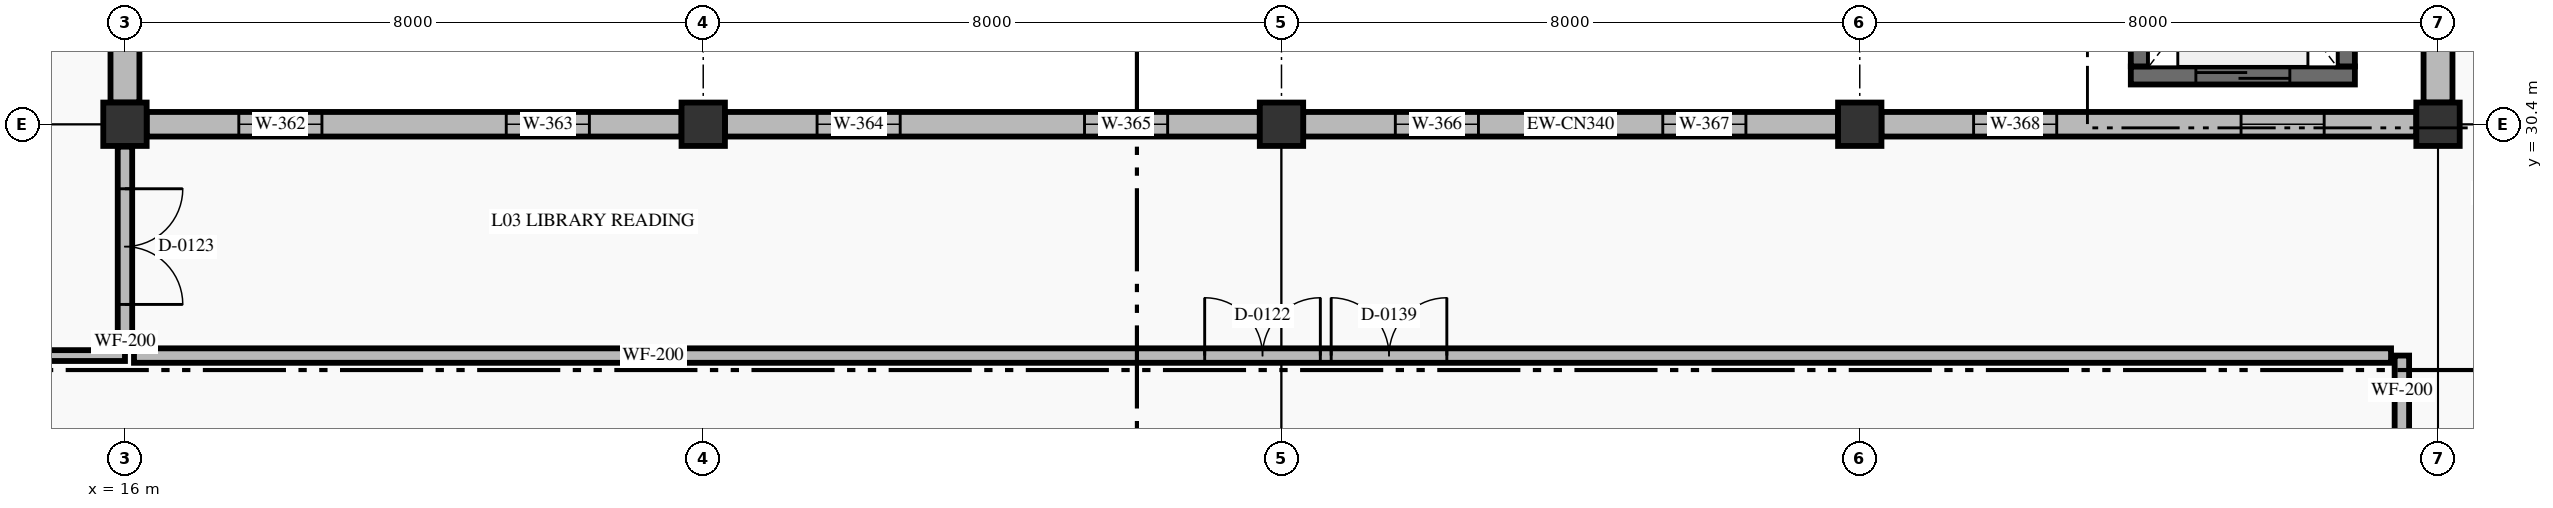
"""IFC4 building model, lengths in metres.
Left out: names, types, materials, properties, quantities, classifications, styles, units other than length and angle.
Written with IfcOpenShell. Run it as: python <this file> out.ifc"""

import sys

from ifc_helpers import new_model, si_unit, direction, frame, frame_2d, origin, origin_2d, place, context, subcontext, project, spatial, rectangle, extrude, element, fill, save


model = new_model("IFC4")
c1 = context("Model", 3, precision=1e-05, world=origin(), true_north=direction((0.0, 1.0)))
c2 = subcontext(c1, "Body", "Model", "MODEL_VIEW")
j1 = project(units=[si_unit("LENGTHUNIT", "METRE"), si_unit("PLANEANGLEUNIT", "RADIAN")], contexts=[c1])
p1 = place(None, origin())
s1 = spatial("IfcSite", under=j1, at=p1, CompositionType="ELEMENT")
p2 = place(p1, origin())
s2 = spatial("IfcBuilding", under=s1, at=p2, CompositionType="ELEMENT")
p3 = place(p2, frame((0.0, 0.0, 10.2)))
s3 = spatial("IfcBuildingStorey", under=s2, at=p3, CompositionType="ELEMENT", Elevation=10.2)
for number, where, z_axis, x_axis in (
    (1, (16.0, 30.4, 0.0), (0.0, 0.0, 1.0), (1.0, 0.0, 0.0)),
    (2, (24.0, 30.4, 0.0), (0.0, 0.0, 1.0), (1.0, 0.0, 0.0)),
    (3, (32.0, 30.4, 0.0), (0.0, 0.0, 1.0), (1.0, 0.0, 0.0)),
    (4, (40.0, 30.4, 0.0), (0.0, 0.0, 1.0), (1.0, 0.0, 0.0)),
    (5, (48.0, 30.4, 0.0), (0.0, 0.0, 1.0), (1.0, 0.0, 0.0)),
):
    element("IfcColumn", number, at=place(p3, frame(where, z_axis=z_axis, x_axis=x_axis)), inside=s3, PredefinedType="COLUMN", context=c2, shape_type="SweptSolid", body=[
        extrude(rectangle(XDim=0.6, YDim=0.6, at=origin_2d()), origin(), (0.0, 0.0, 1.0), 4.5),
    ])
p4 = place(p3, frame((16.0, 37.7, 0.0), z_axis=(0.0, 0.0, 1.0), x_axis=(0.0, -1.0, 0.0)))
e6 = element("IfcWall", 6, at=p4, inside=s3, PredefinedType="STANDARD", context=c2, shape_type="SweptSolid", body=[
    extrude(rectangle(XDim=7.0, YDim=0.4, at=frame_2d((3.5, 0.0))), origin(), (0.0, 0.0, 1.0), 3.67),
])
p5 = place(p4, frame((1.0, 0.0, 0.9)))
e7 = element("IfcOpeningElement", 7, at=p5, cuts=e6, PredefinedType="OPENING", context=c2, shape_type="SweptSolid", body=[
    extrude(rectangle(XDim=1.5, YDim=2.0, at=frame_2d((0.75, 1.0))), frame((0.0, 0.21, 0.0), z_axis=(0.0, -1.0, 0.0), x_axis=(1.0, 0.0, 0.0)), (0.0, 0.0, 1.0), 0.42),
])
p6 = place(p4, frame((4.5, 0.0, 0.9)))
e8 = element("IfcOpeningElement", 8, at=p6, cuts=e6, PredefinedType="OPENING", context=c2, shape_type="SweptSolid", body=[
    extrude(rectangle(XDim=1.5, YDim=2.0, at=frame_2d((0.75, 1.0))), frame((0.0, 0.21, 0.0), z_axis=(0.0, -1.0, 0.0), x_axis=(1.0, 0.0, 0.0)), (0.0, 0.0, 1.0), 0.42),
])
p7 = place(p3, frame((16.3, 30.4, 0.0), z_axis=(0.0, 0.0, 1.0), x_axis=(1.0, 0.0, 0.0)))
e9 = element("IfcWall", 9, at=p7, inside=s3, PredefinedType="STANDARD", context=c2, shape_type="SweptSolid", body=[
    extrude(rectangle(XDim=7.4, YDim=0.34, at=frame_2d((3.7, 0.0))), origin(), (0.0, 0.0, 1.0), 3.62),
])
p8 = place(p7, frame((1.275, 0.0, 1.05)))
e10 = element("IfcOpeningElement", 10, at=p8, cuts=e9, PredefinedType="OPENING", context=c2, shape_type="SweptSolid", body=[
    extrude(rectangle(XDim=1.15, YDim=1.5, at=frame_2d((0.575, 0.75))), frame((0.0, 0.18, 0.0), z_axis=(0.0, -1.0, 0.0), x_axis=(1.0, 0.0, 0.0)), (0.0, 0.0, 1.0), 0.36),
])
p9 = place(p7, frame((4.975, 0.0, 1.05)))
e11 = element("IfcOpeningElement", 11, at=p9, cuts=e9, PredefinedType="OPENING", context=c2, shape_type="SweptSolid", body=[
    extrude(rectangle(XDim=1.15, YDim=1.5, at=frame_2d((0.575, 0.75))), frame((0.0, 0.18, 0.0), z_axis=(0.0, -1.0, 0.0), x_axis=(1.0, 0.0, 0.0)), (0.0, 0.0, 1.0), 0.36),
])
p10 = place(p3, frame((24.3, 30.4, 0.0), z_axis=(0.0, 0.0, 1.0), x_axis=(1.0, 0.0, 0.0)))
e12 = element("IfcWall", 12, at=p10, inside=s3, PredefinedType="STANDARD", context=c2, shape_type="SweptSolid", body=[
    extrude(rectangle(XDim=7.4, YDim=0.34, at=frame_2d((3.7, 0.0))), origin(), (0.0, 0.0, 1.0), 3.62),
])
p11 = place(p10, frame((1.275, 0.0, 1.05)))
e13 = element("IfcOpeningElement", 13, at=p11, cuts=e12, PredefinedType="OPENING", context=c2, shape_type="SweptSolid", body=[
    extrude(rectangle(XDim=1.15, YDim=1.5, at=frame_2d((0.575, 0.75))), frame((0.0, 0.18, 0.0), z_axis=(0.0, -1.0, 0.0), x_axis=(1.0, 0.0, 0.0)), (0.0, 0.0, 1.0), 0.36),
])
p12 = place(p10, frame((4.975, 0.0, 1.05)))
e14 = element("IfcOpeningElement", 14, at=p12, cuts=e12, PredefinedType="OPENING", context=c2, shape_type="SweptSolid", body=[
    extrude(rectangle(XDim=1.15, YDim=1.5, at=frame_2d((0.575, 0.75))), frame((0.0, 0.18, 0.0), z_axis=(0.0, -1.0, 0.0), x_axis=(1.0, 0.0, 0.0)), (0.0, 0.0, 1.0), 0.36),
])
p13 = place(p3, frame((32.3, 30.4, 0.0), z_axis=(0.0, 0.0, 1.0), x_axis=(1.0, 0.0, 0.0)))
e15 = element("IfcWall", 15, at=p13, inside=s3, PredefinedType="STANDARD", context=c2, shape_type="SweptSolid", body=[
    extrude(rectangle(XDim=7.4, YDim=0.34, at=frame_2d((3.7, 0.0))), origin(), (0.0, 0.0, 1.0), 3.62),
])
p14 = place(p13, frame((1.275, 0.0, 1.05)))
e16 = element("IfcOpeningElement", 16, at=p14, cuts=e15, PredefinedType="OPENING", context=c2, shape_type="SweptSolid", body=[
    extrude(rectangle(XDim=1.15, YDim=1.5, at=frame_2d((0.575, 0.75))), frame((0.0, 0.18, 0.0), z_axis=(0.0, -1.0, 0.0), x_axis=(1.0, 0.0, 0.0)), (0.0, 0.0, 1.0), 0.36),
])
p15 = place(p13, frame((4.975, 0.0, 1.05)))
e17 = element("IfcOpeningElement", 17, at=p15, cuts=e15, PredefinedType="OPENING", context=c2, shape_type="SweptSolid", body=[
    extrude(rectangle(XDim=1.15, YDim=1.5, at=frame_2d((0.575, 0.75))), frame((0.0, 0.18, 0.0), z_axis=(0.0, -1.0, 0.0), x_axis=(1.0, 0.0, 0.0)), (0.0, 0.0, 1.0), 0.36),
])
p16 = place(p3, frame((40.3, 30.4, 0.0), z_axis=(0.0, 0.0, 1.0), x_axis=(1.0, 0.0, 0.0)))
e18 = element("IfcWall", 18, at=p16, inside=s3, PredefinedType="STANDARD", context=c2, shape_type="SweptSolid", body=[
    extrude(rectangle(XDim=7.4, YDim=0.34, at=frame_2d((3.7, 0.0))), origin(), (0.0, 0.0, 1.0), 3.62),
])
p17 = place(p16, frame((1.275, 0.0, 1.05)))
e19 = element("IfcOpeningElement", 19, at=p17, cuts=e18, PredefinedType="OPENING", context=c2, shape_type="SweptSolid", body=[
    extrude(rectangle(XDim=1.15, YDim=1.5, at=frame_2d((0.575, 0.75))), frame((0.0, 0.18, 0.0), z_axis=(0.0, -1.0, 0.0), x_axis=(1.0, 0.0, 0.0)), (0.0, 0.0, 1.0), 0.36),
])
p18 = place(p16, frame((4.975, 0.0, 1.05)))
e20 = element("IfcOpeningElement", 20, at=p18, cuts=e18, PredefinedType="OPENING", context=c2, shape_type="SweptSolid", body=[
    extrude(rectangle(XDim=1.15, YDim=1.5, at=frame_2d((0.575, 0.75))), frame((0.0, 0.18, 0.0), z_axis=(0.0, -1.0, 0.0), x_axis=(1.0, 0.0, 0.0)), (0.0, 0.0, 1.0), 0.36),
])
p19 = place(p3, frame((48.0, 30.7, 0.0), z_axis=(0.0, 0.0, 1.0), x_axis=(0.0, 1.0, 0.0)))
e21 = element("IfcWall", 21, at=p19, inside=s3, PredefinedType="STANDARD", context=c2, shape_type="SweptSolid", body=[
    extrude(rectangle(XDim=7.0, YDim=0.4, at=frame_2d((3.5, 0.0))), origin(), (0.0, 0.0, 1.0), 3.67),
])
p20 = place(p19, frame((0.9, 0.0, 0.9)))
e22 = element("IfcOpeningElement", 22, at=p20, cuts=e21, PredefinedType="OPENING", context=c2, shape_type="SweptSolid", body=[
    extrude(rectangle(XDim=1.7, YDim=2.35, at=frame_2d((0.85, 1.175))), frame((0.0, 0.21, 0.0), z_axis=(0.0, -1.0, 0.0), x_axis=(1.0, 0.0, 0.0)), (0.0, 0.0, 1.0), 0.42),
])
p21 = place(p19, frame((4.4, 0.0, 0.9)))
e23 = element("IfcOpeningElement", 23, at=p21, cuts=e21, PredefinedType="OPENING", context=c2, shape_type="SweptSolid", body=[
    extrude(rectangle(XDim=1.7, YDim=2.35, at=frame_2d((0.85, 1.175))), frame((0.0, 0.21, 0.0), z_axis=(0.0, -1.0, 0.0), x_axis=(1.0, 0.0, 0.0)), (0.0, 0.0, 1.0), 0.42),
])
p22 = place(p3, frame((46.85, 31.075, 0.0), z_axis=(0.0, 0.0, 1.0), x_axis=(-1.0, 0.0, 0.0)))
e24 = element("IfcWall", 24, at=p22, inside=s3, PredefinedType="SHEAR", context=c2, shape_type="SweptSolid", body=[
    extrude(rectangle(XDim=3.1, YDim=0.25, at=frame_2d((1.55, 0.0))), origin(), (0.0, 0.0, 1.0), 4.26),
])
p23 = place(p22, frame((0.9, 0.0, 0.0)))
e25 = element("IfcOpeningElement", 25, at=p23, cuts=e24, PredefinedType="OPENING", context=c2, shape_type="SweptSolid", body=[
    extrude(rectangle(XDim=1.3, YDim=2.25, at=frame_2d((0.65, 1.125))), frame((0.0, 0.135, 0.0), z_axis=(0.0, -1.0, 0.0), x_axis=(1.0, 0.0, 0.0)), (0.0, 0.0, 1.0), 0.27),
])
for number, where, z_axis, x_axis in (
    (26, (43.875, 31.2, 0.0), (0.0, 0.0, 1.0), (0.0, 1.0, 0.0)),
    (27, (46.725, 34.6, 0.0), (0.0, 0.0, 1.0), (0.0, -1.0, 0.0)),
):
    element("IfcWall", number, at=place(p3, frame(where, z_axis=z_axis, x_axis=x_axis)), inside=s3, PredefinedType="SHEAR", context=c2, shape_type="SweptSolid", body=[
        extrude(rectangle(XDim=3.4, YDim=0.25, at=frame_2d((1.7, 0.0))), origin(), (0.0, 0.0, 1.0), 4.26),
    ])
p24 = place(p3, frame((8.0, 27.2, 0.0), z_axis=(0.0, 0.0, 1.0), x_axis=(1.0, 0.0, 0.0)))
e28 = element("IfcWall", 28, at=p24, inside=s3, PredefinedType="PARTITIONING", context=c2, shape_type="SweptSolid", body=[
    extrude(rectangle(XDim=8.0, YDim=0.15, at=frame_2d((4.0, 0.0))), origin(), (0.0, 0.0, 1.0), 4.26),
])
p25 = place(p3, frame((47.5, 27.2, 0.0), z_axis=(0.0, 0.0, 1.0), x_axis=(0.0, -1.0, 0.0)))
e29 = element("IfcWall", 29, at=p25, inside=s3, PredefinedType="STANDARD", context=c2, shape_type="SweptSolid", body=[
    extrude(rectangle(XDim=4.4, YDim=0.2, at=frame_2d((2.2, 0.0))), origin(), (0.0, 0.0, 1.0), 4.26),
])
p26 = place(p25, frame((1.4, 0.0, 0.0)))
e30 = element("IfcOpeningElement", 30, at=p26, cuts=e29, PredefinedType="OPENING", context=c2, shape_type="SweptSolid", body=[
    extrude(rectangle(XDim=1.6, YDim=2.3, at=frame_2d((0.8, 1.15))), frame((0.0, 0.11, 0.0), z_axis=(0.0, -1.0, 0.0), x_axis=(1.0, 0.0, 0.0)), (0.0, 0.0, 1.0), 0.22),
])
p27 = place(p3, frame((16.125, 27.2, 0.0), z_axis=(0.0, 0.0, 1.0), x_axis=(1.0, 0.0, 0.0)))
e31 = element("IfcWall", 31, at=p27, inside=s3, PredefinedType="STANDARD", context=c2, shape_type="SweptSolid", body=[
    extrude(rectangle(XDim=31.225, YDim=0.2, at=frame_2d((15.613, 0.0))), origin(), (0.0, 0.0, 1.0), 4.26),
])
p28 = place(p27, frame((14.812, 0.0, 0.0)))
e32 = element("IfcOpeningElement", 32, at=p28, cuts=e31, PredefinedType="OPENING", context=c2, shape_type="SweptSolid", body=[
    extrude(rectangle(XDim=1.6, YDim=2.3, at=frame_2d((0.8, 1.15))), frame((0.0, 0.11, 0.0), z_axis=(0.0, -1.0, 0.0), x_axis=(1.0, 0.0, 0.0)), (0.0, 0.0, 1.0), 0.22),
])
p29 = place(p27, frame((16.562, 0.0, 0.0)))
e33 = element("IfcOpeningElement", 33, at=p29, cuts=e31, PredefinedType="OPENING", context=c2, shape_type="SweptSolid", body=[
    extrude(rectangle(XDim=1.6, YDim=2.3, at=frame_2d((0.8, 1.15))), frame((0.0, 0.11, 0.0), z_axis=(0.0, -1.0, 0.0), x_axis=(1.0, 0.0, 0.0)), (0.0, 0.0, 1.0), 0.22),
])
p30 = place(p3, frame((16.0, 30.09, 0.0), z_axis=(0.0, 0.0, 1.0), x_axis=(0.0, -1.0, 0.0)))
e34 = element("IfcWall", 34, at=p30, inside=s3, PredefinedType="STANDARD", context=c2, shape_type="SweptSolid", body=[
    extrude(rectangle(XDim=2.765, YDim=0.2, at=frame_2d((1.383, 0.0))), origin(), (0.0, 0.0, 1.0), 3.67),
])
p31 = place(p30, frame((0.583, 0.0, 0.0)))
e35 = element("IfcOpeningElement", 35, at=p31, cuts=e34, PredefinedType="OPENING", context=c2, shape_type="SweptSolid", body=[
    extrude(rectangle(XDim=1.6, YDim=2.3, at=frame_2d((0.8, 1.15))), frame((0.0, 0.11, 0.0), z_axis=(0.0, -1.0, 0.0), x_axis=(1.0, 0.0, 0.0)), (0.0, 0.0, 1.0), 0.22),
])
p32 = place(p8, origin())
e36 = element("IfcWindow", 36, at=p32, inside=s3, PartitioningType="SINGLE_PANEL", PredefinedType="WINDOW", context=c2, shape_type="SweptSolid", body=[
    extrude(rectangle(XDim=1.15, YDim=1.5, at=frame_2d((0.575, 0.75))), frame((0.0, 0.03, 0.0), z_axis=(0.0, -1.0, 0.0), x_axis=(1.0, 0.0, 0.0)), (0.0, 0.0, 1.0), 0.06),
])
fill(e10, e36)
p33 = place(p9, origin())
e37 = element("IfcWindow", 37, at=p33, inside=s3, PartitioningType="SINGLE_PANEL", PredefinedType="WINDOW", context=c2, shape_type="SweptSolid", body=[
    extrude(rectangle(XDim=1.15, YDim=1.5, at=frame_2d((0.575, 0.75))), frame((0.0, 0.03, 0.0), z_axis=(0.0, -1.0, 0.0), x_axis=(1.0, 0.0, 0.0)), (0.0, 0.0, 1.0), 0.06),
])
fill(e11, e37)
p34 = place(p11, origin())
e38 = element("IfcWindow", 38, at=p34, inside=s3, PartitioningType="SINGLE_PANEL", PredefinedType="WINDOW", context=c2, shape_type="SweptSolid", body=[
    extrude(rectangle(XDim=1.15, YDim=1.5, at=frame_2d((0.575, 0.75))), frame((0.0, 0.03, 0.0), z_axis=(0.0, -1.0, 0.0), x_axis=(1.0, 0.0, 0.0)), (0.0, 0.0, 1.0), 0.06),
])
fill(e13, e38)
p35 = place(p12, origin())
e39 = element("IfcWindow", 39, at=p35, inside=s3, PartitioningType="SINGLE_PANEL", PredefinedType="WINDOW", context=c2, shape_type="SweptSolid", body=[
    extrude(rectangle(XDim=1.15, YDim=1.5, at=frame_2d((0.575, 0.75))), frame((0.0, 0.03, 0.0), z_axis=(0.0, -1.0, 0.0), x_axis=(1.0, 0.0, 0.0)), (0.0, 0.0, 1.0), 0.06),
])
fill(e14, e39)
p36 = place(p14, origin())
e40 = element("IfcWindow", 40, at=p36, inside=s3, PartitioningType="SINGLE_PANEL", PredefinedType="WINDOW", context=c2, shape_type="SweptSolid", body=[
    extrude(rectangle(XDim=1.15, YDim=1.5, at=frame_2d((0.575, 0.75))), frame((0.0, 0.03, 0.0), z_axis=(0.0, -1.0, 0.0), x_axis=(1.0, 0.0, 0.0)), (0.0, 0.0, 1.0), 0.06),
])
fill(e16, e40)
p37 = place(p15, origin())
e41 = element("IfcWindow", 41, at=p37, inside=s3, PartitioningType="SINGLE_PANEL", PredefinedType="WINDOW", context=c2, shape_type="SweptSolid", body=[
    extrude(rectangle(XDim=1.15, YDim=1.5, at=frame_2d((0.575, 0.75))), frame((0.0, 0.03, 0.0), z_axis=(0.0, -1.0, 0.0), x_axis=(1.0, 0.0, 0.0)), (0.0, 0.0, 1.0), 0.06),
])
fill(e17, e41)
p38 = place(p17, origin())
e42 = element("IfcWindow", 42, at=p38, inside=s3, PartitioningType="SINGLE_PANEL", PredefinedType="WINDOW", context=c2, shape_type="SweptSolid", body=[
    extrude(rectangle(XDim=1.15, YDim=1.5, at=frame_2d((0.575, 0.75))), frame((0.0, 0.03, 0.0), z_axis=(0.0, -1.0, 0.0), x_axis=(1.0, 0.0, 0.0)), (0.0, 0.0, 1.0), 0.06),
])
fill(e19, e42)
p39 = place(p18, origin())
e43 = element("IfcWindow", 43, at=p39, inside=s3, PartitioningType="SINGLE_PANEL", PredefinedType="WINDOW", context=c2, shape_type="SweptSolid", body=[
    extrude(rectangle(XDim=1.15, YDim=1.5, at=frame_2d((0.575, 0.75))), frame((0.0, 0.03, 0.0), z_axis=(0.0, -1.0, 0.0), x_axis=(1.0, 0.0, 0.0)), (0.0, 0.0, 1.0), 0.06),
])
fill(e20, e43)
p40 = place(p23, origin())
e44 = element("IfcDoor", 44, at=p40, inside=s3, OperationType="DOUBLE_DOOR_SLIDING", PredefinedType="DOOR", context=c2, shape_type="SweptSolid", body=[
    extrude(rectangle(XDim=1.3, YDim=2.25, at=frame_2d((0.65, 1.125))), frame((0.0, 0.025, 0.0), z_axis=(0.0, -1.0, 0.0), x_axis=(1.0, 0.0, 0.0)), (0.0, 0.0, 1.0), 0.05),
])
fill(e25, e44)
p41 = place(p28, origin())
e45 = element("IfcDoor", 45, at=p41, inside=s3, OperationType="DOUBLE_DOOR_SINGLE_SWING", PredefinedType="DOOR", context=c2, shape_type="SweptSolid", body=[
    extrude(rectangle(XDim=1.6, YDim=2.3, at=frame_2d((0.8, 1.15))), frame((0.0, 0.025, 0.0), z_axis=(0.0, -1.0, 0.0), x_axis=(1.0, 0.0, 0.0)), (0.0, 0.0, 1.0), 0.05),
])
fill(e32, e45)
p42 = place(p31, origin())
e46 = element("IfcDoor", 46, at=p42, inside=s3, OperationType="DOUBLE_DOOR_SINGLE_SWING", PredefinedType="DOOR", context=c2, shape_type="SweptSolid", body=[
    extrude(rectangle(XDim=1.6, YDim=2.3, at=frame_2d((0.8, 1.15))), frame((0.0, 0.025, 0.0), z_axis=(0.0, -1.0, 0.0), x_axis=(1.0, 0.0, 0.0)), (0.0, 0.0, 1.0), 0.05),
])
fill(e35, e46)
p43 = place(p29, origin())
e47 = element("IfcDoor", 47, at=p43, inside=s3, OperationType="DOUBLE_DOOR_SINGLE_SWING", PredefinedType="DOOR", context=c2, shape_type="SweptSolid", body=[
    extrude(rectangle(XDim=1.6, YDim=2.3, at=frame_2d((0.8, 1.15))), frame((0.0, 0.025, 0.0), z_axis=(0.0, -1.0, 0.0), x_axis=(1.0, 0.0, 0.0)), (0.0, 0.0, 1.0), 0.05),
])
fill(e33, e47)
save(model, sys.argv[1])
